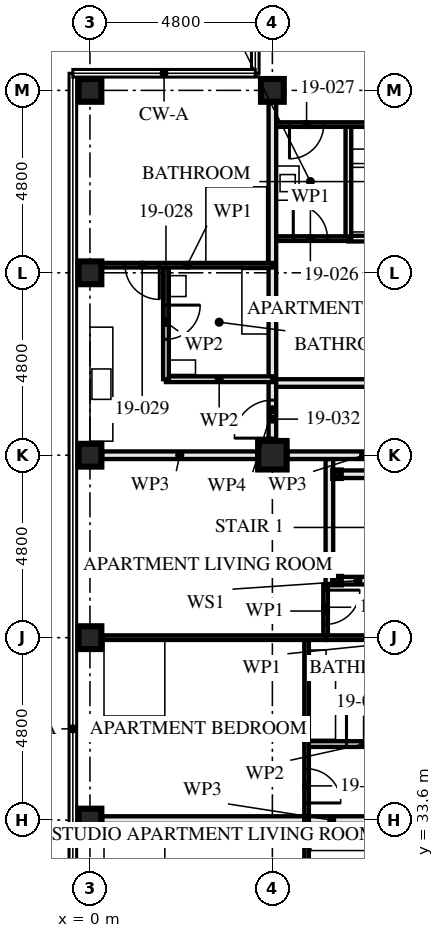
"""IFC4 building model, lengths in metres.
Left out: names, types, materials, properties, quantities, classifications, styles, units other than length and angle.
Written with IfcOpenShell. Run it as: python <this file> out.ifc"""

import sys

from ifc_helpers import new_model, si_unit, direction, frame, frame_2d, origin, origin_2d, place, context, subcontext, project, spatial, rectangle, hollow_rectangle, extrude, element, fill, save


model = new_model("IFC4")
c1 = context("Model", 3, precision=1e-05, world=origin(), true_north=direction((0.0, 1.0)))
c2 = subcontext(c1, "Body", "Model", "MODEL_VIEW")
j1 = project(units=[si_unit("LENGTHUNIT", "METRE"), si_unit("PLANEANGLEUNIT", "RADIAN")], contexts=[c1])
p1 = place(None, origin())
s1 = spatial("IfcSite", under=j1, at=p1, CompositionType="ELEMENT")
p2 = place(p1, origin())
s2 = spatial("IfcBuilding", under=s1, at=p2, CompositionType="ELEMENT")
p3 = place(p2, frame((0.0, 0.0, 72.5)))
s3 = spatial("IfcBuildingStorey", under=s2, at=p3, CompositionType="ELEMENT", Elevation=72.5)
for number, where, z_axis, x_axis in (
    (1, (0.0, 33.6, 0.0), (0.0, 0.0, 1.0), (1.0, 0.0, 0.0)),
    (2, (0.0, 38.4, 0.0), (0.0, 0.0, 1.0), (1.0, 0.0, 0.0)),
    (3, (0.0, 43.2, 0.0), (0.0, 0.0, 1.0), (0.0, 1.0, 0.0)),
    (4, (0.0, 48.0, 0.0), (0.0, 0.0, 1.0), (1.0, 0.0, 0.0)),
    (5, (0.0, 52.8, 0.0), (0.0, 0.0, 1.0), (0.0, 1.0, 0.0)),
):
    element("IfcColumn", number, at=place(p3, frame(where, z_axis=z_axis, x_axis=x_axis)), inside=s3, PredefinedType="COLUMN", context=c2, shape_type="SweptSolid", body=[
        extrude(hollow_rectangle(XDim=0.6, YDim=0.6, WallThickness=0.08, at=origin_2d()), origin(), (0.0, 0.0, 1.0), 3.5),
    ])
p4 = place(p3, frame((4.8, 43.2, 0.0), z_axis=(0.0, 0.0, 1.0), x_axis=(0.0, 1.0, 0.0)))
e6 = element("IfcColumn", 6, at=p4, inside=s3, PredefinedType="COLUMN", context=c2, shape_type="SweptSolid", body=[
    extrude(hollow_rectangle(XDim=0.75, YDim=0.75, WallThickness=0.08, at=origin_2d()), origin(), (0.0, 0.0, 1.0), 3.5),
])
p5 = place(p3, frame((4.8, 52.8, 0.0), z_axis=(0.0, 0.0, 1.0), x_axis=(0.0, 1.0, 0.0)))
e7 = element("IfcColumn", 7, at=p5, inside=s3, PredefinedType="COLUMN", context=c2, shape_type="SweptSolid", body=[
    extrude(hollow_rectangle(XDim=0.6, YDim=0.6, WallThickness=0.08, at=origin_2d()), origin(), (0.0, 0.0, 1.0), 3.5),
])
for number, where, z_axis, x_axis in (
    (8, (6.5, 42.7, 0.0), (0.0, 0.0, 1.0), (1.0, 0.0, 0.0)),
    (9, (6.5, 39.9, 0.0), (0.0, 0.0, 1.0), (1.0, 0.0, 0.0)),
):
    element("IfcColumn", number, at=place(p3, frame(where, z_axis=z_axis, x_axis=x_axis)), inside=s3, PredefinedType="COLUMN", context=c2, shape_type="SweptSolid", body=[
        extrude(hollow_rectangle(XDim=0.2, YDim=0.2, WallThickness=0.008, at=origin_2d()), origin(), (0.0, 0.0, 1.0), 3.33),
    ])
for number, where, z_axis, x_axis in (
    (10, (6.6, 42.7, 0.0), (0.0, 0.0, 1.0), (1.0, 0.0, 0.0)),
    (11, (6.6, 39.9, 0.0), (0.0, 0.0, 1.0), (1.0, 0.0, 0.0)),
):
    element("IfcWall", number, at=place(p3, frame(where, z_axis=z_axis, x_axis=x_axis)), inside=s3, PredefinedType="SOLIDWALL", context=c2, shape_type="SweptSolid", body=[
        extrude(rectangle(XDim=0.9, YDim=0.2, at=frame_2d((0.45, 0.0))), origin(), (0.0, 0.0, 1.0), 2.99),
    ])
p6 = place(p3, frame((6.3, 43.1, 0.0), z_axis=(0.0, 0.0, 1.0), x_axis=(0.0, -1.0, 0.0)))
e12 = element("IfcWall", 12, at=p6, inside=s3, PredefinedType="SOLIDWALL", context=c2, shape_type="SweptSolid", body=[
    extrude(rectangle(XDim=3.3, YDim=0.2, at=frame_2d((1.65, 0.0))), origin(), (0.0, 0.0, 1.0), 3.33),
])
p7 = place(p3, frame((5.7, 35.6, 0.0), z_axis=(0.0, 0.0, 1.0), x_axis=(1.0, 0.0, 0.0)))
e13 = element("IfcWall", 13, at=p7, inside=s3, PredefinedType="PARTITIONING", context=c2, shape_type="SweptSolid", body=[
    extrude(rectangle(XDim=3.0, YDim=0.15, at=frame_2d((1.5, 0.0))), origin(), (0.0, 0.0, 1.0), 3.33),
])
p8 = place(p7, frame((1.05, 0.0, 0.0)))
e14 = element("IfcOpeningElement", 14, at=p8, cuts=e13, PredefinedType="OPENING", context=c2, shape_type="SweptSolid", body=[
    extrude(rectangle(XDim=0.9, YDim=2.1, at=frame_2d((0.45, 1.05))), frame((0.0, 0.085, 0.0), z_axis=(0.0, -1.0, 0.0), x_axis=(1.0, 0.0, 0.0)), (0.0, 0.0, 1.0), 0.171),
])
p9 = place(p3, frame((6.2, 38.4, 0.0), z_axis=(0.0, 0.0, 1.0), x_axis=(1.0, 0.0, 0.0)))
e15 = element("IfcWall", 15, at=p9, inside=s3, PredefinedType="PARTITIONING", context=c2, shape_type="SweptSolid", body=[
    extrude(rectangle(XDim=6.25, YDim=0.12, at=frame_2d((3.125, 0.0))), origin(), (0.0, 0.0, 1.0), 2.55),
])
p10 = place(p9, frame((3.9, 0.0, 0.0)))
e16 = element("IfcOpeningElement", 16, at=p10, cuts=e15, PredefinedType="OPENING", context=c2, shape_type="SweptSolid", body=[
    extrude(rectangle(XDim=0.9, YDim=2.1, at=frame_2d((0.45, 1.05))), frame((0.0, 0.071, 0.0), z_axis=(0.0, -1.0, 0.0), x_axis=(1.0, 0.0, 0.0)), (0.0, 0.0, 1.0), 0.141),
])
p11 = place(p3, frame((6.2, 39.8, 0.0), z_axis=(0.0, 0.0, 1.0), x_axis=(0.0, -1.0, 0.0)))
e17 = element("IfcWall", 17, at=p11, inside=s3, PredefinedType="PARTITIONING", context=c2, shape_type="SweptSolid", body=[
    extrude(rectangle(XDim=1.4, YDim=0.12, at=frame_2d((0.7, 0.0))), origin(), (0.0, 0.0, 1.0), 3.33),
])
p12 = place(p11, frame((0.15, 0.0, 0.0)))
e18 = element("IfcOpeningElement", 18, at=p12, cuts=e17, PredefinedType="OPENING", context=c2, shape_type="SweptSolid", body=[
    extrude(rectangle(XDim=0.9, YDim=2.1, at=frame_2d((0.45, 1.05))), frame((0.0, 0.071, 0.0), z_axis=(0.0, -1.0, 0.0), x_axis=(1.0, 0.0, 0.0)), (0.0, 0.0, 1.0), 0.141),
])
p13 = place(p3, frame((5.7, 38.4, 0.0), z_axis=(0.0, 0.0, 1.0), x_axis=(0.0, -1.0, 0.0)))
e19 = element("IfcWall", 19, at=p13, inside=s3, PredefinedType="PARTITIONING", context=c2, shape_type="SweptSolid", body=[
    extrude(rectangle(XDim=4.8, YDim=0.12, at=frame_2d((2.4, 0.0))), origin(), (0.0, 0.0, 1.0), 3.33),
])
p14 = place(p13, frame((3.45, 0.0, 0.0)))
e20 = element("IfcOpeningElement", 20, at=p14, cuts=e19, PredefinedType="OPENING", context=c2, shape_type="SweptSolid", body=[
    extrude(rectangle(XDim=0.9, YDim=2.1, at=frame_2d((0.45, 1.05))), frame((0.0, 0.071, 0.0), z_axis=(0.0, -1.0, 0.0), x_axis=(1.0, 0.0, 0.0)), (0.0, 0.0, 1.0), 0.141),
])
p15 = place(p3, frame((0.32, 38.4, 0.0), z_axis=(0.0, 0.0, 1.0), x_axis=(1.0, 0.0, 0.0)))
e21 = element("IfcWall", 21, at=p15, inside=s3, PredefinedType="PARTITIONING", context=c2, shape_type="SweptSolid", body=[
    extrude(rectangle(XDim=5.88, YDim=0.12, at=frame_2d((2.94, 0.0))), origin(), (0.0, 0.0, 1.0), 2.55),
])
p16 = place(p3, frame((0.32, 33.6, 0.0), z_axis=(0.0, 0.0, 1.0), x_axis=(1.0, 0.0, 0.0)))
e22 = element("IfcWall", 22, at=p16, inside=s3, PredefinedType="PARTITIONING", context=c2, shape_type="SweptSolid", body=[
    extrude(rectangle(XDim=12.08, YDim=0.2, at=frame_2d((6.04, 0.0))), origin(), (0.0, 0.0, 1.0), 2.55),
])
p17 = place(p3, frame((5.7, 33.6, 0.0), z_axis=(0.0, 0.0, 1.0), x_axis=(0.0, -1.0, 0.0)))
e23 = element("IfcWall", 23, at=p17, inside=s3, PredefinedType="PARTITIONING", context=c2, shape_type="SweptSolid", body=[
    extrude(rectangle(XDim=4.8, YDim=0.12, at=frame_2d((2.4, 0.0))), origin(), (0.0, 0.0, 1.0), 3.33),
])
p18 = place(p17, frame((3.45, 0.0, 0.0)))
e24 = element("IfcOpeningElement", 24, at=p18, cuts=e23, PredefinedType="OPENING", context=c2, shape_type="SweptSolid", body=[
    extrude(rectangle(XDim=0.9, YDim=2.1, at=frame_2d((0.45, 1.05))), frame((0.0, 0.071, 0.0), z_axis=(0.0, -1.0, 0.0), x_axis=(1.0, 0.0, 0.0)), (0.0, 0.0, 1.0), 0.141),
])
p19 = place(p3, frame((6.8, 51.9, 0.0), z_axis=(0.0, 0.0, 1.0), x_axis=(0.0, -1.0, 0.0)))
e25 = element("IfcWall", 25, at=p19, inside=s3, PredefinedType="PARTITIONING", context=c2, shape_type="SweptSolid", body=[
    extrude(rectangle(XDim=3.0, YDim=0.15, at=frame_2d((1.5, 0.0))), origin(), (0.0, 0.0, 1.0), 3.33),
])
p20 = place(p3, frame((9.6, 48.9, 0.0), z_axis=(0.0, 0.0, 1.0), x_axis=(-1.0, 0.0, 0.0)))
e26 = element("IfcWall", 26, at=p20, inside=s3, PredefinedType="PARTITIONING", context=c2, shape_type="SweptSolid", body=[
    extrude(rectangle(XDim=2.8, YDim=0.15, at=frame_2d((1.4, 0.0))), origin(), (0.0, 0.0, 1.0), 3.33),
])
p21 = place(p20, frame((0.95, 0.0, 0.0)))
e27 = element("IfcOpeningElement", 27, at=p21, cuts=e26, PredefinedType="OPENING", context=c2, shape_type="SweptSolid", body=[
    extrude(rectangle(XDim=0.9, YDim=2.1, at=frame_2d((0.45, 1.05))), frame((0.0, 0.085, 0.0), z_axis=(0.0, -1.0, 0.0), x_axis=(1.0, 0.0, 0.0)), (0.0, 0.0, 1.0), 0.171),
])
p22 = place(p3, frame((6.8, 48.9, 0.0), z_axis=(0.0, 0.0, 1.0), x_axis=(-1.0, 0.0, 0.0)))
e28 = element("IfcWall", 28, at=p22, inside=s3, PredefinedType="PARTITIONING", context=c2, shape_type="SweptSolid", body=[
    extrude(rectangle(XDim=2.0, YDim=0.12, at=frame_2d((1.0, 0.0))), origin(), (0.0, 0.0, 1.0), 3.33),
])
p23 = place(p22, frame((0.55, 0.0, 0.0)))
e29 = element("IfcOpeningElement", 29, at=p23, cuts=e28, PredefinedType="OPENING", context=c2, shape_type="SweptSolid", body=[
    extrude(rectangle(XDim=0.9, YDim=2.1, at=frame_2d((0.45, 1.05))), frame((0.0, 0.071, 0.0), z_axis=(0.0, -1.0, 0.0), x_axis=(1.0, 0.0, 0.0)), (0.0, 0.0, 1.0), 0.141),
])
p24 = place(p3, frame((9.6, 51.9, 0.0), z_axis=(0.0, 0.0, 1.0), x_axis=(-1.0, 0.0, 0.0)))
e30 = element("IfcWall", 30, at=p24, inside=s3, PredefinedType="PARTITIONING", context=c2, shape_type="SweptSolid", body=[
    extrude(rectangle(XDim=4.8, YDim=0.12, at=frame_2d((2.4, 0.0))), origin(), (0.0, 0.0, 1.0), 3.33),
])
p25 = place(p24, frame((3.45, 0.0, 0.0)))
e31 = element("IfcOpeningElement", 31, at=p25, cuts=e30, PredefinedType="OPENING", context=c2, shape_type="SweptSolid", body=[
    extrude(rectangle(XDim=0.9, YDim=2.1, at=frame_2d((0.45, 1.05))), frame((0.0, 0.071, 0.0), z_axis=(0.0, -1.0, 0.0), x_axis=(1.0, 0.0, 0.0)), (0.0, 0.0, 1.0), 0.141),
])
p26 = place(p3, frame((4.8, 52.48, 0.0), z_axis=(0.0, 0.0, 1.0), x_axis=(0.0, -1.0, 0.0)))
e32 = element("IfcWall", 32, at=p26, inside=s3, PredefinedType="PARTITIONING", context=c2, shape_type="SweptSolid", body=[
    extrude(rectangle(XDim=7.28, YDim=0.2, at=frame_2d((3.64, 0.0))), origin(), (0.0, 0.0, 1.0), 2.55),
])
p27 = place(p3, frame((2.0, 48.2, 0.0), z_axis=(0.0, 0.0, 1.0), x_axis=(0.0, -1.0, 0.0)))
e33 = element("IfcWall", 33, at=p27, inside=s3, PredefinedType="PARTITIONING", context=c2, shape_type="SweptSolid", body=[
    extrude(rectangle(XDim=3.0, YDim=0.15, at=frame_2d((1.5, 0.0))), origin(), (0.0, 0.0, 1.0), 2.55),
])
p28 = place(p27, frame((1.05, 0.0, 0.0)))
e34 = element("IfcOpeningElement", 34, at=p28, cuts=e33, PredefinedType="OPENING", context=c2, shape_type="SweptSolid", body=[
    extrude(rectangle(XDim=0.9, YDim=2.1, at=frame_2d((0.45, 1.05))), frame((0.0, 0.085, 0.0), z_axis=(0.0, -1.0, 0.0), x_axis=(1.0, 0.0, 0.0)), (0.0, 0.0, 1.0), 0.171),
])
p29 = place(p3, frame((4.8, 45.2, 0.0), z_axis=(0.0, 0.0, 1.0), x_axis=(-1.0, 0.0, 0.0)))
e35 = element("IfcWall", 35, at=p29, inside=s3, PredefinedType="PARTITIONING", context=c2, shape_type="SweptSolid", body=[
    extrude(rectangle(XDim=2.8, YDim=0.15, at=frame_2d((1.4, 0.0))), origin(), (0.0, 0.0, 1.0), 3.33),
])
p30 = place(p3, frame((4.8, 48.2, 0.0), z_axis=(0.0, 0.0, 1.0), x_axis=(-1.0, 0.0, 0.0)))
e36 = element("IfcWall", 36, at=p30, inside=s3, PredefinedType="PARTITIONING", context=c2, shape_type="SweptSolid", body=[
    extrude(rectangle(XDim=4.48, YDim=0.12, at=frame_2d((2.24, 0.0))), origin(), (0.0, 0.0, 1.0), 3.33),
])
p31 = place(p30, frame((2.975, 0.0, 0.0)))
e37 = element("IfcOpeningElement", 37, at=p31, cuts=e36, PredefinedType="OPENING", context=c2, shape_type="SweptSolid", body=[
    extrude(rectangle(XDim=0.9, YDim=2.1, at=frame_2d((0.45, 1.05))), frame((0.0, 0.071, 0.0), z_axis=(0.0, -1.0, 0.0), x_axis=(1.0, 0.0, 0.0)), (0.0, 0.0, 1.0), 0.141),
])
p32 = place(p3, frame((14.4, 45.1, 0.0), z_axis=(0.0, 0.0, 1.0), x_axis=(-1.0, 0.0, 0.0)))
e38 = element("IfcWall", 38, at=p32, inside=s3, PredefinedType="PARTITIONING", context=c2, shape_type="SweptSolid", body=[
    extrude(rectangle(XDim=9.6, YDim=0.2, at=frame_2d((4.8, 0.0))), origin(), (0.0, 0.0, 1.0), 3.33),
])
p33 = place(p32, frame((0.4, 0.0, 0.0)))
e39 = element("IfcOpeningElement", 39, at=p33, cuts=e38, PredefinedType="OPENING", context=c2, shape_type="SweptSolid", body=[
    extrude(rectangle(XDim=1.0, YDim=2.1, at=frame_2d((0.5, 1.05))), frame((0.0, 0.111, 0.0), z_axis=(0.0, -1.0, 0.0), x_axis=(1.0, 0.0, 0.0)), (0.0, 0.0, 1.0), 0.221),
])
p34 = place(p32, frame((5.2, 0.0, 0.0)))
e40 = element("IfcOpeningElement", 40, at=p34, cuts=e38, PredefinedType="OPENING", context=c2, shape_type="SweptSolid", body=[
    extrude(rectangle(XDim=1.0, YDim=2.1, at=frame_2d((0.5, 1.05))), frame((0.0, 0.111, 0.0), z_axis=(0.0, -1.0, 0.0), x_axis=(1.0, 0.0, 0.0)), (0.0, 0.0, 1.0), 0.221),
])
p35 = place(p3, frame((4.8, 45.2, 0.0), z_axis=(0.0, 0.0, 1.0), x_axis=(0.0, -1.0, 0.0)))
e41 = element("IfcWall", 41, at=p35, inside=s3, PredefinedType="PARTITIONING", context=c2, shape_type="SweptSolid", body=[
    extrude(rectangle(XDim=1.605, YDim=0.2, at=frame_2d((0.802, 0.0))), origin(), (0.0, 0.0, 1.0), 3.33),
])
p36 = place(p35, frame((0.55, 0.0, 0.0)))
e42 = element("IfcOpeningElement", 42, at=p36, cuts=e41, PredefinedType="OPENING", context=c2, shape_type="SweptSolid", body=[
    extrude(rectangle(XDim=1.0, YDim=2.1, at=frame_2d((0.5, 1.05))), frame((0.0, 0.111, 0.0), z_axis=(0.0, -1.0, 0.0), x_axis=(1.0, 0.0, 0.0)), (0.0, 0.0, 1.0), 0.221),
])
p37 = place(p3, frame((9.205, 43.2, 0.0), z_axis=(0.0, 0.0, 1.0), x_axis=(-1.0, 0.0, 0.0)))
e43 = element("IfcWall", 43, at=p37, inside=s3, PredefinedType="PARTITIONING", context=c2, shape_type="SweptSolid", body=[
    extrude(rectangle(XDim=4.01, YDim=0.2, at=frame_2d((2.005, 0.0))), origin(), (0.0, 0.0, 1.0), 2.32),
])
p38 = place(p3, frame((4.405, 43.2, 0.0), z_axis=(0.0, 0.0, 1.0), x_axis=(-1.0, 0.0, 0.0)))
e44 = element("IfcWall", 44, at=p38, inside=s3, PredefinedType="PARTITIONING", context=c2, shape_type="SweptSolid", body=[
    extrude(rectangle(XDim=4.085, YDim=0.2, at=frame_2d((2.042, 0.0))), origin(), (0.0, 0.0, 1.0), 2.32),
])
p39 = place(p8, origin())
e45 = element("IfcDoor", 45, at=p39, inside=s3, OperationType="SINGLE_SWING_RIGHT", PredefinedType="DOOR", context=c2, shape_type="SweptSolid", body=[
    extrude(rectangle(XDim=0.9, YDim=2.1, at=frame_2d((0.45, 1.05))), frame((0.0, 0.022, 0.0), z_axis=(0.0, -1.0, 0.0), x_axis=(1.0, 0.0, 0.0)), (0.0, 0.0, 1.0), 0.044),
])
fill(e14, e45)
p40 = place(p12, origin())
e46 = element("IfcDoor", 46, at=p40, inside=s3, OperationType="SINGLE_SWING_RIGHT", PredefinedType="DOOR", context=c2, shape_type="SweptSolid", body=[
    extrude(rectangle(XDim=0.9, YDim=2.1, at=frame_2d((0.45, 1.05))), frame((0.0, 0.022, 0.0), z_axis=(0.0, -1.0, 0.0), x_axis=(1.0, 0.0, 0.0)), (0.0, 0.0, 1.0), 0.044),
])
fill(e18, e46)
p41 = place(p14, origin())
e47 = element("IfcDoor", 47, at=p41, inside=s3, OperationType="SINGLE_SWING_LEFT", PredefinedType="DOOR", context=c2, shape_type="SweptSolid", body=[
    extrude(rectangle(XDim=0.9, YDim=2.1, at=frame_2d((0.45, 1.05))), frame((0.0, 0.022, 0.0), z_axis=(0.0, -1.0, 0.0), x_axis=(1.0, 0.0, 0.0)), (0.0, 0.0, 1.0), 0.044),
])
fill(e20, e47)
p42 = place(p23, frame((0.9, 0.0, 0.0), z_axis=(0.0, 0.0, 1.0), x_axis=(-1.0, 0.0, 0.0)))
e48 = element("IfcDoor", 48, at=p42, inside=s3, OperationType="SINGLE_SWING_RIGHT", PredefinedType="DOOR", context=c2, shape_type="SweptSolid", body=[
    extrude(rectangle(XDim=0.9, YDim=2.1, at=frame_2d((0.45, 1.05))), frame((0.0, 0.022, 0.0), z_axis=(0.0, -1.0, 0.0), x_axis=(1.0, 0.0, 0.0)), (0.0, 0.0, 1.0), 0.044),
])
fill(e29, e48)
p43 = place(p25, origin())
e49 = element("IfcDoor", 49, at=p43, inside=s3, OperationType="SINGLE_SWING_LEFT", PredefinedType="DOOR", context=c2, shape_type="SweptSolid", body=[
    extrude(rectangle(XDim=0.9, YDim=2.1, at=frame_2d((0.45, 1.05))), frame((0.0, 0.022, 0.0), z_axis=(0.0, -1.0, 0.0), x_axis=(1.0, 0.0, 0.0)), (0.0, 0.0, 1.0), 0.044),
])
fill(e31, e49)
p44 = place(p28, origin())
e50 = element("IfcDoor", 50, at=p44, inside=s3, OperationType="SINGLE_SWING_RIGHT", PredefinedType="DOOR", context=c2, shape_type="SweptSolid", body=[
    extrude(rectangle(XDim=0.9, YDim=2.1, at=frame_2d((0.45, 1.05))), frame((0.0, 0.022, 0.0), z_axis=(0.0, -1.0, 0.0), x_axis=(1.0, 0.0, 0.0)), (0.0, 0.0, 1.0), 0.044),
])
fill(e34, e50)
p45 = place(p31, origin())
e51 = element("IfcDoor", 51, at=p45, inside=s3, OperationType="SINGLE_SWING_RIGHT", PredefinedType="DOOR", context=c2, shape_type="SweptSolid", body=[
    extrude(rectangle(XDim=0.9, YDim=2.1, at=frame_2d((0.45, 1.05))), frame((0.0, 0.022, 0.0), z_axis=(0.0, -1.0, 0.0), x_axis=(1.0, 0.0, 0.0)), (0.0, 0.0, 1.0), 0.044),
])
fill(e37, e51)
p46 = place(p36, frame((1.0, 0.0, 0.0), z_axis=(0.0, 0.0, 1.0), x_axis=(-1.0, 0.0, 0.0)))
e52 = element("IfcDoor", 52, at=p46, inside=s3, OperationType="SINGLE_SWING_RIGHT", PredefinedType="DOOR", context=c2, shape_type="SweptSolid", body=[
    extrude(rectangle(XDim=1.0, YDim=2.1, at=frame_2d((0.5, 1.05))), frame((0.0, 0.027, 0.0), z_axis=(0.0, -1.0, 0.0), x_axis=(1.0, 0.0, 0.0)), (0.0, 0.0, 1.0), 0.054),
])
fill(e42, e52)
save(model, sys.argv[1])
